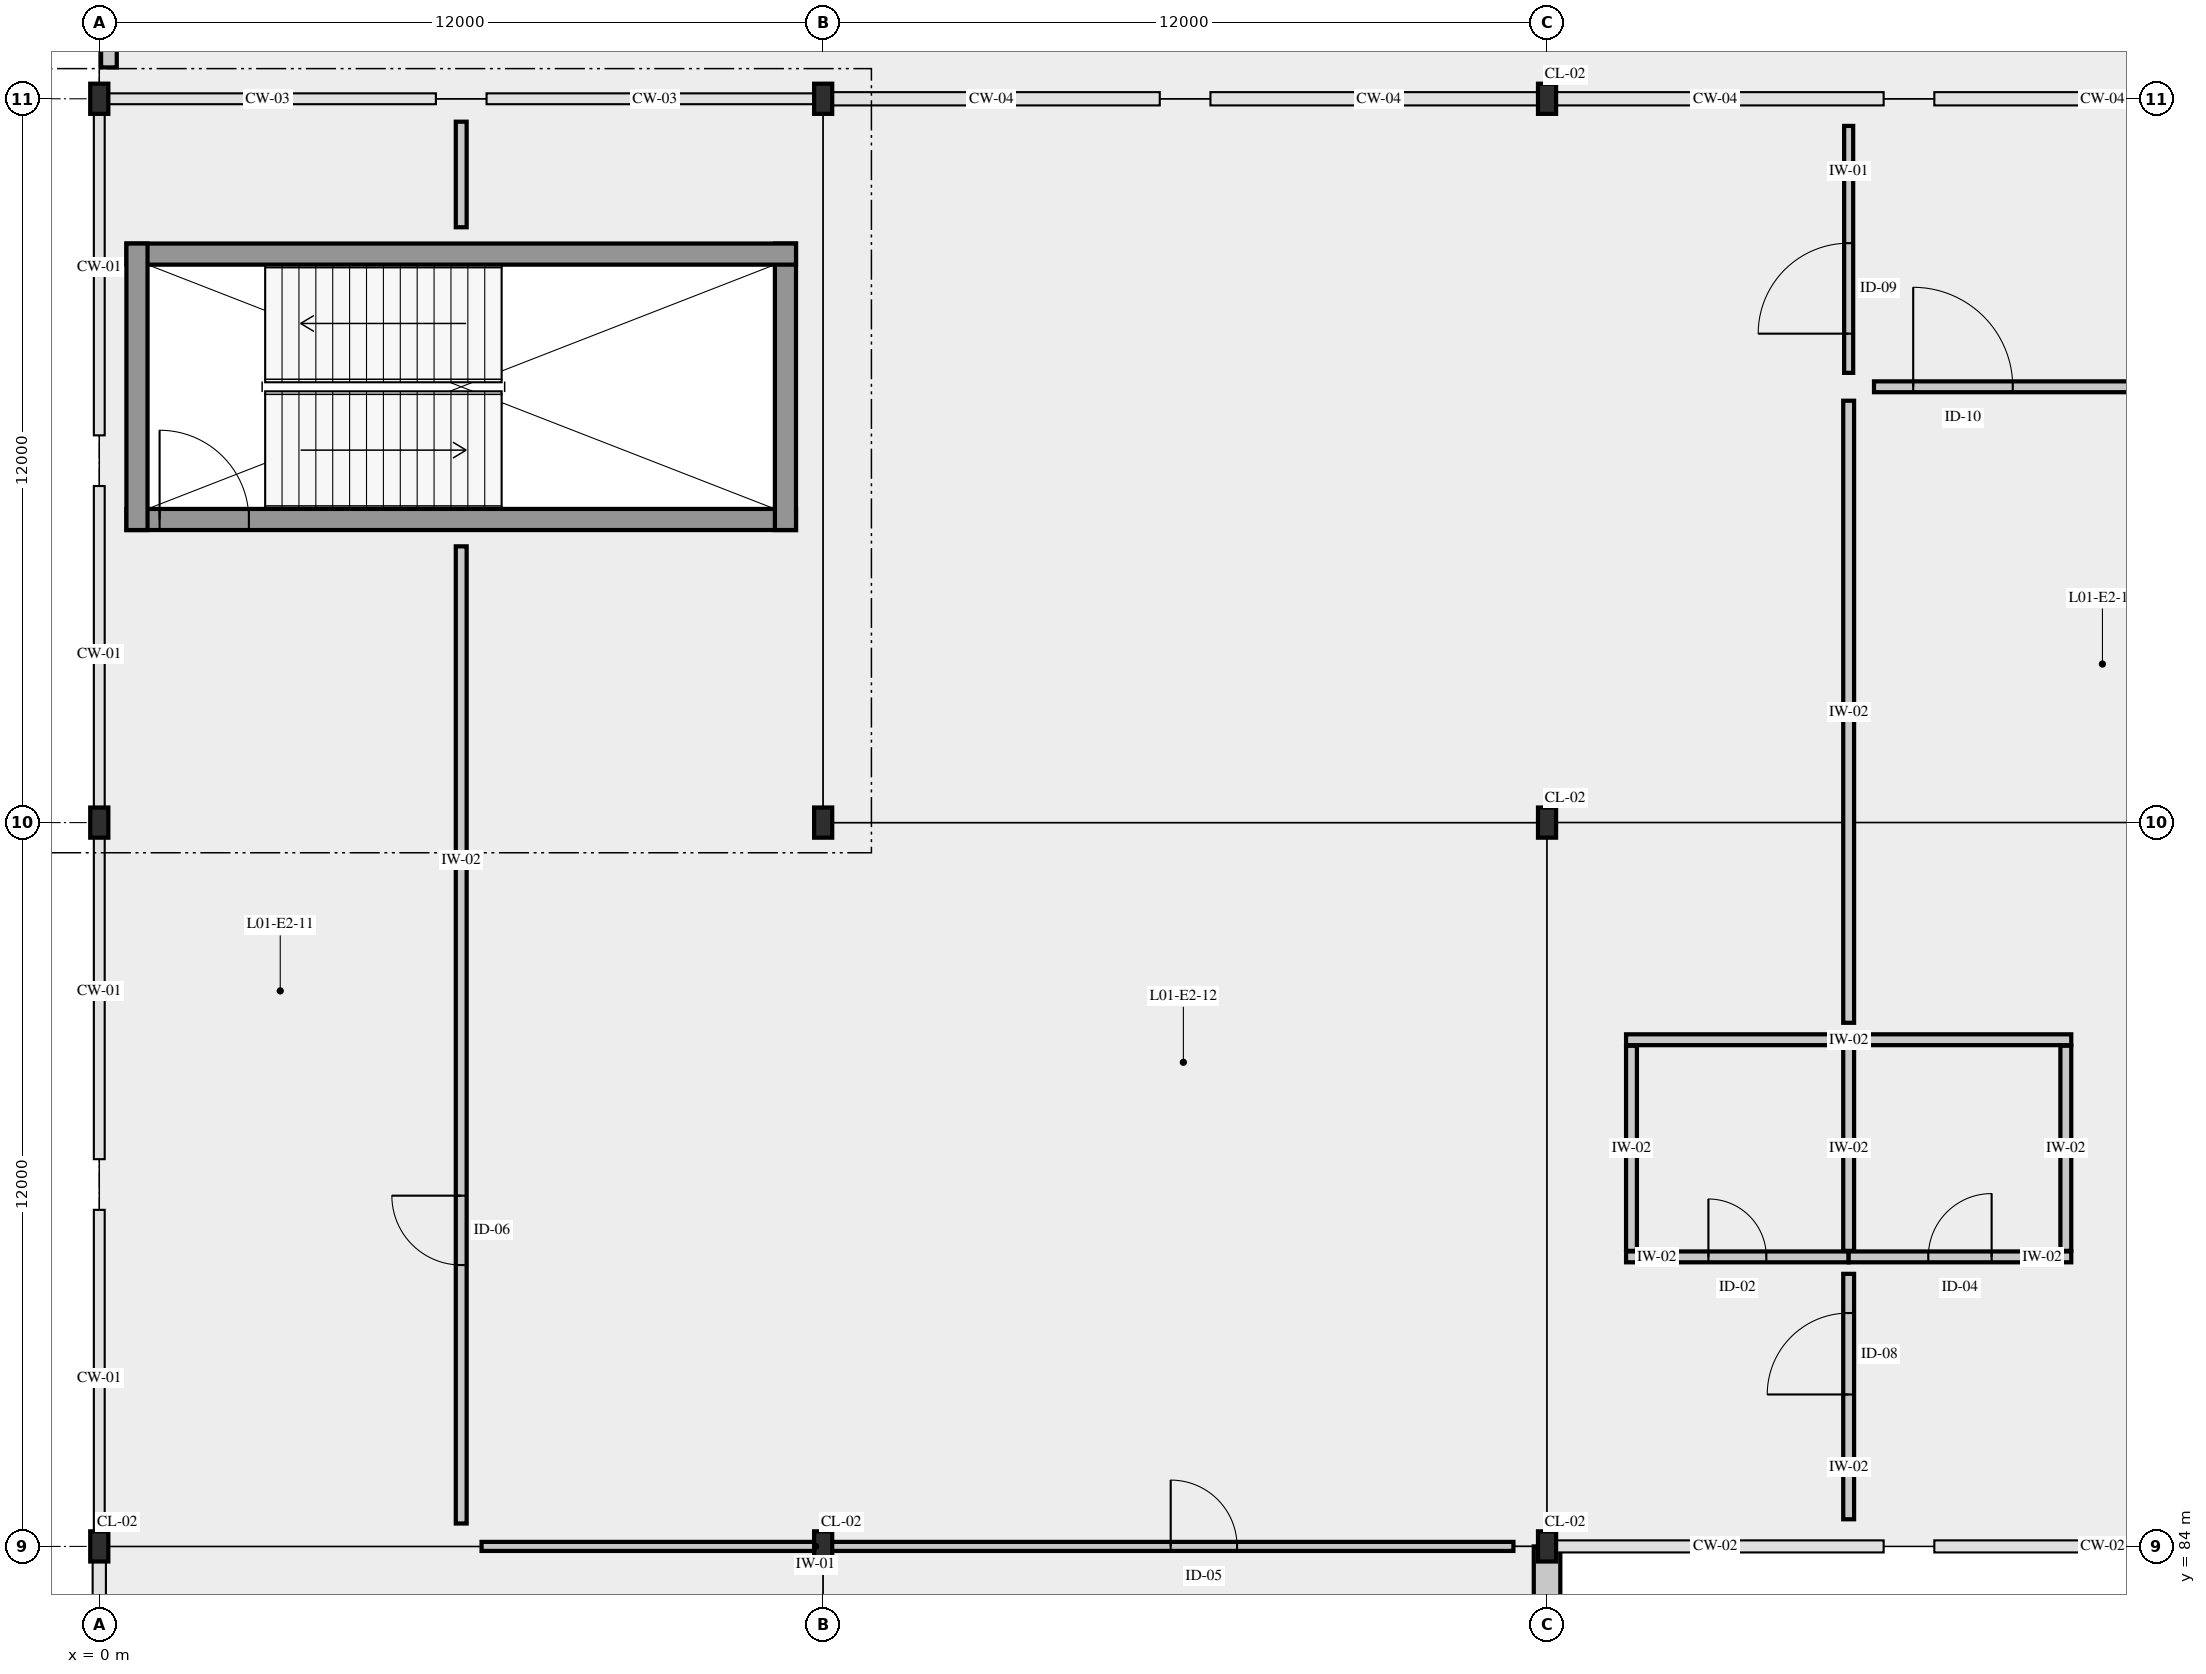
"""IFC4 building model, lengths in metres.
Left out: names, types, materials, properties, quantities, classifications, styles, units other than length and angle.
Written with IfcOpenShell. Run it as: python <this file> out.ifc"""

import sys

from ifc_helpers import new_model, si_unit, direction, frame, frame_2d, origin, origin_2d, place, context, subcontext, project, spatial, rectangle, i_section, extrude, element, fill, save


model = new_model("IFC4")
c1 = context("Model", 3, precision=1e-05, world=origin(), true_north=direction((0.0, 1.0)))
c2 = subcontext(c1, "Body", "Model", "MODEL_VIEW")
j1 = project(units=[si_unit("LENGTHUNIT", "METRE"), si_unit("PLANEANGLEUNIT", "RADIAN")], contexts=[c1])
p1 = place(None, origin())
s1 = spatial("IfcSite", under=j1, at=p1, CompositionType="ELEMENT")
p2 = place(p1, origin())
s2 = spatial("IfcBuilding", under=s1, at=p2, CompositionType="ELEMENT")
p3 = place(p2, frame((0.0, 0.0, 5.4)))
s3 = spatial("IfcBuildingStorey", under=s2, at=p3, CompositionType="ELEMENT", Elevation=5.4)
for number, where, z_axis, x_axis in (
    (1, (0.0, 84.0, 0.0), (0.0, 0.0, 1.0), (1.0, 0.0, 0.0)),
    (2, (0.0, 96.0, 0.0), (0.0, 0.0, 1.0), (1.0, 0.0, 0.0)),
    (3, (0.0, 108.0, 0.0), (0.0, 0.0, 1.0), (1.0, 0.0, 0.0)),
    (4, (12.0, 84.0, 0.0), (0.0, 0.0, 1.0), (1.0, 0.0, 0.0)),
    (5, (12.0, 96.0, 0.0), (0.0, 0.0, 1.0), (1.0, 0.0, 0.0)),
    (6, (12.0, 108.0, 0.0), (0.0, 0.0, 1.0), (1.0, 0.0, 0.0)),
    (7, (24.0, 84.0, 0.0), (0.0, 0.0, 1.0), (1.0, 0.0, 0.0)),
    (8, (24.0, 96.0, 0.0), (0.0, 0.0, 1.0), (1.0, 0.0, 0.0)),
    (9, (24.0, 108.0, 0.0), (0.0, 0.0, 1.0), (1.0, 0.0, 0.0)),
):
    element("IfcColumn", number, at=place(p3, frame(where, z_axis=z_axis, x_axis=x_axis)), inside=s3, PredefinedType="COLUMN", context=c2, shape_type="SweptSolid", body=[
        extrude(i_section(OverallWidth=0.3, OverallDepth=0.5, WebThickness=0.014, FlangeThickness=0.028, FilletRadius=0.027, at=origin_2d()), origin(), (0.0, 0.0, 1.0), 5.4),
    ])
p4 = place(p3, frame((24.0, 74.4, 0.0), z_axis=(0.0, 0.0, 1.0), x_axis=(0.0, 1.0, 0.0)))
e10 = element("IfcWall", 10, at=p4, inside=s3, PredefinedType="SOLIDWALL", context=c2, shape_type="SweptSolid", body=[
    extrude(rectangle(XDim=9.6, YDim=0.44, at=frame_2d((4.8, 0.0))), origin(), (0.0, 0.0, 1.0), 4.48),
])
p5 = place(p4, frame((2.525, 0.0, 0.95)))
e11 = element("IfcOpeningElement", 11, at=p5, cuts=e10, PredefinedType="OPENING", context=c2, shape_type="SweptSolid", body=[
    extrude(rectangle(XDim=1.35, YDim=2.1, at=frame_2d((0.675, 1.05))), frame((0.0, 0.23, 0.0), z_axis=(0.0, -1.0, 0.0), x_axis=(1.0, 0.0, 0.0)), (0.0, 0.0, 1.0), 0.46),
])
p6 = place(p4, frame((5.725, 0.0, 0.95)))
e12 = element("IfcOpeningElement", 12, at=p6, cuts=e10, PredefinedType="OPENING", context=c2, shape_type="SweptSolid", body=[
    extrude(rectangle(XDim=1.35, YDim=2.1, at=frame_2d((0.675, 1.05))), frame((0.0, 0.23, 0.0), z_axis=(0.0, -1.0, 0.0), x_axis=(1.0, 0.0, 0.0)), (0.0, 0.0, 1.0), 0.46),
])
p7 = place(p3, frame((0.16, 108.52, 0.0), z_axis=(0.0, 0.0, 1.0), x_axis=(0.0, 1.0, 0.0)))
e13 = element("IfcWall", 13, at=p7, inside=s3, PredefinedType="PARAPET", context=c2, shape_type="SweptSolid", body=[
    extrude(rectangle(XDim=11.16, YDim=0.26, at=frame_2d((5.58, 0.0))), origin(), (0.0, 0.0, 1.0), 1.15),
])
p8 = place(p3, frame((0.45, 101.025, 0.0), z_axis=(0.0, 0.0, 1.0), x_axis=(1.0, 0.0, 0.0)))
e14 = element("IfcWall", 14, at=p8, inside=s3, PredefinedType="SHEAR", context=c2, shape_type="SweptSolid", body=[
    extrude(rectangle(XDim=11.1, YDim=0.35, at=frame_2d((5.55, 0.0))), origin(), (0.0, 0.0, 1.0), 5.11),
])
p9 = place(p8, frame((0.55, 0.0, 0.0)))
e15 = element("IfcOpeningElement", 15, at=p9, cuts=e14, PredefinedType="OPENING", context=c2, shape_type="SweptSolid", body=[
    extrude(rectangle(XDim=1.48, YDim=2.3, at=frame_2d((0.74, 1.15))), frame((0.0, 0.185, 0.0), z_axis=(0.0, -1.0, 0.0), x_axis=(1.0, 0.0, 0.0)), (0.0, 0.0, 1.0), 0.37),
])
p10 = place(p3, frame((11.375, 100.85, 0.0), z_axis=(0.0, 0.0, 1.0), x_axis=(0.0, 1.0, 0.0)))
e16 = element("IfcWall", 16, at=p10, inside=s3, PredefinedType="SHEAR", context=c2, shape_type="SweptSolid", body=[
    extrude(rectangle(XDim=4.75, YDim=0.35, at=frame_2d((2.375, 0.0))), origin(), (0.0, 0.0, 1.0), 5.11),
])
p11 = place(p3, frame((11.55, 105.425, 0.0), z_axis=(0.0, 0.0, 1.0), x_axis=(-1.0, 0.0, 0.0)))
e17 = element("IfcWall", 17, at=p11, inside=s3, PredefinedType="SHEAR", context=c2, shape_type="SweptSolid", body=[
    extrude(rectangle(XDim=11.1, YDim=0.35, at=frame_2d((5.55, 0.0))), origin(), (0.0, 0.0, 1.0), 5.11),
])
p12 = place(p3, frame((0.625, 105.6, 0.0), z_axis=(0.0, 0.0, 1.0), x_axis=(0.0, -1.0, 0.0)))
e18 = element("IfcWall", 18, at=p12, inside=s3, PredefinedType="SHEAR", context=c2, shape_type="SweptSolid", body=[
    extrude(rectangle(XDim=4.75, YDim=0.35, at=frame_2d((2.375, 0.0))), origin(), (0.0, 0.0, 1.0), 5.11),
])
p13 = place(p3, frame((25.31, 92.4, 0.0), z_axis=(0.0, 0.0, 1.0), x_axis=(1.0, 0.0, 0.0)))
e19 = element("IfcWall", 19, at=p13, inside=s3, PredefinedType="PARTITIONING", context=c2, shape_type="SweptSolid", body=[
    extrude(rectangle(XDim=7.38, YDim=0.18, at=frame_2d((3.69, 0.0))), origin(), (0.0, 0.0, 1.0), 4.64),
])
p14 = place(p3, frame((25.31, 88.8, 0.0), z_axis=(0.0, 0.0, 1.0), x_axis=(1.0, 0.0, 0.0)))
e20 = element("IfcWall", 20, at=p14, inside=s3, PredefinedType="PARTITIONING", context=c2, shape_type="SweptSolid", body=[
    extrude(rectangle(XDim=3.69, YDim=0.18, at=frame_2d((1.845, 0.0))), origin(), (0.0, 0.0, 1.0), 4.64),
])
p15 = place(p14, frame((1.365, 0.0, 0.0)))
e21 = element("IfcOpeningElement", 21, at=p15, cuts=e20, PredefinedType="OPENING", context=c2, shape_type="SweptSolid", body=[
    extrude(rectangle(XDim=0.96, YDim=2.15, at=frame_2d((0.48, 1.075))), frame((0.0, 0.1, 0.0), z_axis=(0.0, -1.0, 0.0), x_axis=(1.0, 0.0, 0.0)), (0.0, 0.0, 1.0), 0.2),
])
p16 = place(p3, frame((29.0, 88.8, 0.0), z_axis=(0.0, 0.0, 1.0), x_axis=(1.0, 0.0, 0.0)))
e22 = element("IfcWall", 22, at=p16, inside=s3, PredefinedType="PARTITIONING", context=c2, shape_type="SweptSolid", body=[
    extrude(rectangle(XDim=3.69, YDim=0.18, at=frame_2d((1.845, 0.0))), origin(), (0.0, 0.0, 1.0), 4.64),
])
p17 = place(p16, frame((1.32, 0.0, 0.0)))
e23 = element("IfcOpeningElement", 23, at=p17, cuts=e22, PredefinedType="OPENING", context=c2, shape_type="SweptSolid", body=[
    extrude(rectangle(XDim=1.05, YDim=2.2, at=frame_2d((0.525, 1.1))), frame((0.0, 0.1, 0.0), z_axis=(0.0, -1.0, 0.0), x_axis=(1.0, 0.0, 0.0)), (0.0, 0.0, 1.0), 0.2),
])
for number, where, z_axis, x_axis in (
    (24, (25.4, 88.9, 0.0), (0.0, 0.0, 1.0), (0.0, 1.0, 0.0)),
    (25, (32.6, 88.9, 0.0), (0.0, 0.0, 1.0), (0.0, 1.0, 0.0)),
    (26, (29.0, 88.9, 0.0), (0.0, 0.0, 1.0), (0.0, 1.0, 0.0)),
):
    element("IfcWall", number, at=place(p3, frame(where, z_axis=z_axis, x_axis=x_axis)), inside=s3, PredefinedType="PARTITIONING", context=c2, shape_type="SweptSolid", body=[
        extrude(rectangle(XDim=3.4, YDim=0.18, at=frame_2d((1.7, 0.0))), origin(), (0.0, 0.0, 1.0), 4.64),
    ])
p18 = place(p3, frame((6.337, 84.0, 0.0), z_axis=(0.0, 0.0, 1.0), x_axis=(1.0, 0.0, 0.0)))
e27 = element("IfcWall", 27, at=p18, inside=s3, PredefinedType="PARTITIONING", context=c2, shape_type="SweptSolid", body=[
    extrude(rectangle(XDim=17.105, YDim=0.15, at=frame_2d((8.553, 0.0))), origin(), (0.0, 0.0, 1.0), 4.55),
])
p19 = place(p18, frame((11.424, 0.0, 0.0)))
e28 = element("IfcOpeningElement", 28, at=p19, cuts=e27, PredefinedType="OPENING", context=c2, shape_type="SweptSolid", body=[
    extrude(rectangle(XDim=1.1, YDim=2.25, at=frame_2d((0.55, 1.125))), frame((0.0, 0.085, 0.0), z_axis=(0.0, -1.0, 0.0), x_axis=(1.0, 0.0, 0.0)), (0.0, 0.0, 1.0), 0.17),
])
p20 = place(p3, frame((6.0, 84.38, 0.0), z_axis=(0.0, 0.0, 1.0), x_axis=(0.0, 1.0, 0.0)))
e29 = element("IfcWall", 29, at=p20, inside=s3, PredefinedType="PARTITIONING", context=c2, shape_type="SweptSolid", body=[
    extrude(rectangle(XDim=16.2, YDim=0.18, at=frame_2d((8.1, 0.0))), origin(), (0.0, 0.0, 1.0), 4.55),
])
p21 = place(p20, frame((4.285, 0.0, 0.0)))
e30 = element("IfcOpeningElement", 30, at=p21, cuts=e29, PredefinedType="OPENING", context=c2, shape_type="SweptSolid", body=[
    extrude(rectangle(XDim=1.15, YDim=2.25, at=frame_2d((0.575, 1.125))), frame((0.0, 0.1, 0.0), z_axis=(0.0, -1.0, 0.0), x_axis=(1.0, 0.0, 0.0)), (0.0, 0.0, 1.0), 0.2),
])
p22 = place(p3, frame((6.0, 105.87, 0.0), z_axis=(0.0, 0.0, 1.0), x_axis=(0.0, 1.0, 0.0)))
e31 = element("IfcWall", 31, at=p22, inside=s3, PredefinedType="PARTITIONING", context=c2, shape_type="SweptSolid", body=[
    extrude(rectangle(XDim=1.75, YDim=0.18, at=frame_2d((0.875, 0.0))), origin(), (0.0, 0.0, 1.0), 5.09),
])
p23 = place(p3, frame((29.0, 84.45, 0.0), z_axis=(0.0, 0.0, 1.0), x_axis=(0.0, 1.0, 0.0)))
e32 = element("IfcWall", 32, at=p23, inside=s3, PredefinedType="PARTITIONING", context=c2, shape_type="SweptSolid", body=[
    extrude(rectangle(XDim=4.069, YDim=0.18, at=frame_2d((2.035, 0.0))), origin(), (0.0, 0.0, 1.0), 4.64),
])
p24 = place(p23, frame((2.069, 0.0, 0.0)))
e33 = element("IfcOpeningElement", 33, at=p24, cuts=e32, PredefinedType="OPENING", context=c2, shape_type="SweptSolid", body=[
    extrude(rectangle(XDim=1.35, YDim=2.3, at=frame_2d((0.675, 1.15))), frame((0.0, 0.1, 0.0), z_axis=(0.0, -1.0, 0.0), x_axis=(1.0, 0.0, 0.0)), (0.0, 0.0, 1.0), 0.2),
])
p25 = place(p3, frame((29.0, 92.681, 0.0), z_axis=(0.0, 0.0, 1.0), x_axis=(0.0, 1.0, 0.0)))
e34 = element("IfcWall", 34, at=p25, inside=s3, PredefinedType="PARTITIONING", context=c2, shape_type="SweptSolid", body=[
    extrude(rectangle(XDim=10.313, YDim=0.18, at=frame_2d((5.156, 0.0))), origin(), (0.0, 0.0, 1.0), 4.55),
])
p26 = place(p3, frame((29.0, 103.456, 0.0), z_axis=(0.0, 0.0, 1.0), x_axis=(0.0, 1.0, 0.0)))
e35 = element("IfcWall", 35, at=p26, inside=s3, PredefinedType="PARTITIONING", context=c2, shape_type="SweptSolid", body=[
    extrude(rectangle(XDim=4.094, YDim=0.15, at=frame_2d((2.047, 0.0))), origin(), (0.0, 0.0, 1.0), 4.64),
])
p27 = place(p26, frame((0.65, 0.0, 0.0)))
e36 = element("IfcOpeningElement", 36, at=p27, cuts=e35, PredefinedType="OPENING", context=c2, shape_type="SweptSolid", body=[
    extrude(rectangle(XDim=1.5, YDim=2.35, at=frame_2d((0.75, 1.175))), frame((0.0, 0.085, 0.0), z_axis=(0.0, -1.0, 0.0), x_axis=(1.0, 0.0, 0.0)), (0.0, 0.0, 1.0), 0.17),
])
p28 = place(p3, frame((29.42, 103.225, 0.0), z_axis=(0.0, 0.0, 1.0), x_axis=(1.0, 0.0, 0.0)))
e37 = element("IfcWall", 37, at=p28, inside=s3, PredefinedType="PARTITIONING", context=c2, shape_type="SweptSolid", body=[
    extrude(rectangle(XDim=6.76, YDim=0.18, at=frame_2d((3.38, 0.0))), origin(), (0.0, 0.0, 1.0), 4.6),
])
p29 = place(p28, frame((0.65, 0.0, 0.0)))
e38 = element("IfcOpeningElement", 38, at=p29, cuts=e37, PredefinedType="OPENING", context=c2, shape_type="SweptSolid", body=[
    extrude(rectangle(XDim=1.65, YDim=2.35, at=frame_2d((0.825, 1.175))), frame((0.0, 0.1, 0.0), z_axis=(0.0, -1.0, 0.0), x_axis=(1.0, 0.0, 0.0)), (0.0, 0.0, 1.0), 0.2),
])
p30 = place(p9, origin())
e39 = element("IfcDoor", 39, at=p30, inside=s3, OperationType="DOUBLE_DOOR_SINGLE_SWING", PredefinedType="DOOR", context=c2, shape_type="SweptSolid", body=[
    extrude(rectangle(XDim=1.48, YDim=2.3, at=frame_2d((0.74, 1.15))), frame((0.0, 0.025, 0.0), z_axis=(0.0, -1.0, 0.0), x_axis=(1.0, 0.0, 0.0)), (0.0, 0.0, 1.0), 0.05),
])
fill(e15, e39)
p31 = place(p15, origin())
e40 = element("IfcDoor", 40, at=p31, inside=s3, OperationType="SINGLE_SWING_LEFT", PredefinedType="DOOR", context=c2, shape_type="SweptSolid", body=[
    extrude(rectangle(XDim=0.96, YDim=2.15, at=frame_2d((0.48, 1.075))), frame((0.0, 0.025, 0.0), z_axis=(0.0, -1.0, 0.0), x_axis=(1.0, 0.0, 0.0)), (0.0, 0.0, 1.0), 0.05),
])
fill(e21, e40)
p32 = place(p17, origin())
e41 = element("IfcDoor", 41, at=p32, inside=s3, OperationType="SINGLE_SWING_RIGHT", PredefinedType="DOOR", context=c2, shape_type="SweptSolid", body=[
    extrude(rectangle(XDim=1.05, YDim=2.2, at=frame_2d((0.525, 1.1))), frame((0.0, 0.025, 0.0), z_axis=(0.0, -1.0, 0.0), x_axis=(1.0, 0.0, 0.0)), (0.0, 0.0, 1.0), 0.05),
])
fill(e23, e41)
p33 = place(p19, origin())
e42 = element("IfcDoor", 42, at=p33, inside=s3, OperationType="SINGLE_SWING_LEFT", PredefinedType="DOOR", context=c2, shape_type="SweptSolid", body=[
    extrude(rectangle(XDim=1.1, YDim=2.25, at=frame_2d((0.55, 1.125))), frame((0.0, 0.025, 0.0), z_axis=(0.0, -1.0, 0.0), x_axis=(1.0, 0.0, 0.0)), (0.0, 0.0, 1.0), 0.05),
])
fill(e28, e42)
p34 = place(p21, origin())
e43 = element("IfcDoor", 43, at=p34, inside=s3, OperationType="SINGLE_SWING_RIGHT", PredefinedType="DOOR", context=c2, shape_type="SweptSolid", body=[
    extrude(rectangle(XDim=1.15, YDim=2.25, at=frame_2d((0.575, 1.125))), frame((0.0, 0.025, 0.0), z_axis=(0.0, -1.0, 0.0), x_axis=(1.0, 0.0, 0.0)), (0.0, 0.0, 1.0), 0.05),
])
fill(e30, e43)
p35 = place(p24, origin())
e44 = element("IfcDoor", 44, at=p35, inside=s3, OperationType="DOUBLE_SWING_LEFT", PredefinedType="DOOR", context=c2, shape_type="SweptSolid", body=[
    extrude(rectangle(XDim=1.35, YDim=2.3, at=frame_2d((0.675, 1.15))), frame((0.0, 0.025, 0.0), z_axis=(0.0, -1.0, 0.0), x_axis=(1.0, 0.0, 0.0)), (0.0, 0.0, 1.0), 0.05),
])
fill(e33, e44)
p36 = place(p27, origin())
e45 = element("IfcDoor", 45, at=p36, inside=s3, OperationType="DOUBLE_DOOR_SINGLE_SWING", PredefinedType="DOOR", context=c2, shape_type="SweptSolid", body=[
    extrude(rectangle(XDim=1.5, YDim=2.35, at=frame_2d((0.75, 1.175))), frame((0.0, 0.025, 0.0), z_axis=(0.0, -1.0, 0.0), x_axis=(1.0, 0.0, 0.0)), (0.0, 0.0, 1.0), 0.05),
])
fill(e36, e45)
p37 = place(p29, origin())
e46 = element("IfcDoor", 46, at=p37, inside=s3, OperationType="DOUBLE_DOOR_SINGLE_SWING", PredefinedType="DOOR", context=c2, shape_type="SweptSolid", body=[
    extrude(rectangle(XDim=1.65, YDim=2.35, at=frame_2d((0.825, 1.175))), frame((0.0, 0.025, 0.0), z_axis=(0.0, -1.0, 0.0), x_axis=(1.0, 0.0, 0.0)), (0.0, 0.0, 1.0), 0.05),
])
fill(e38, e46)
save(model, sys.argv[1])
